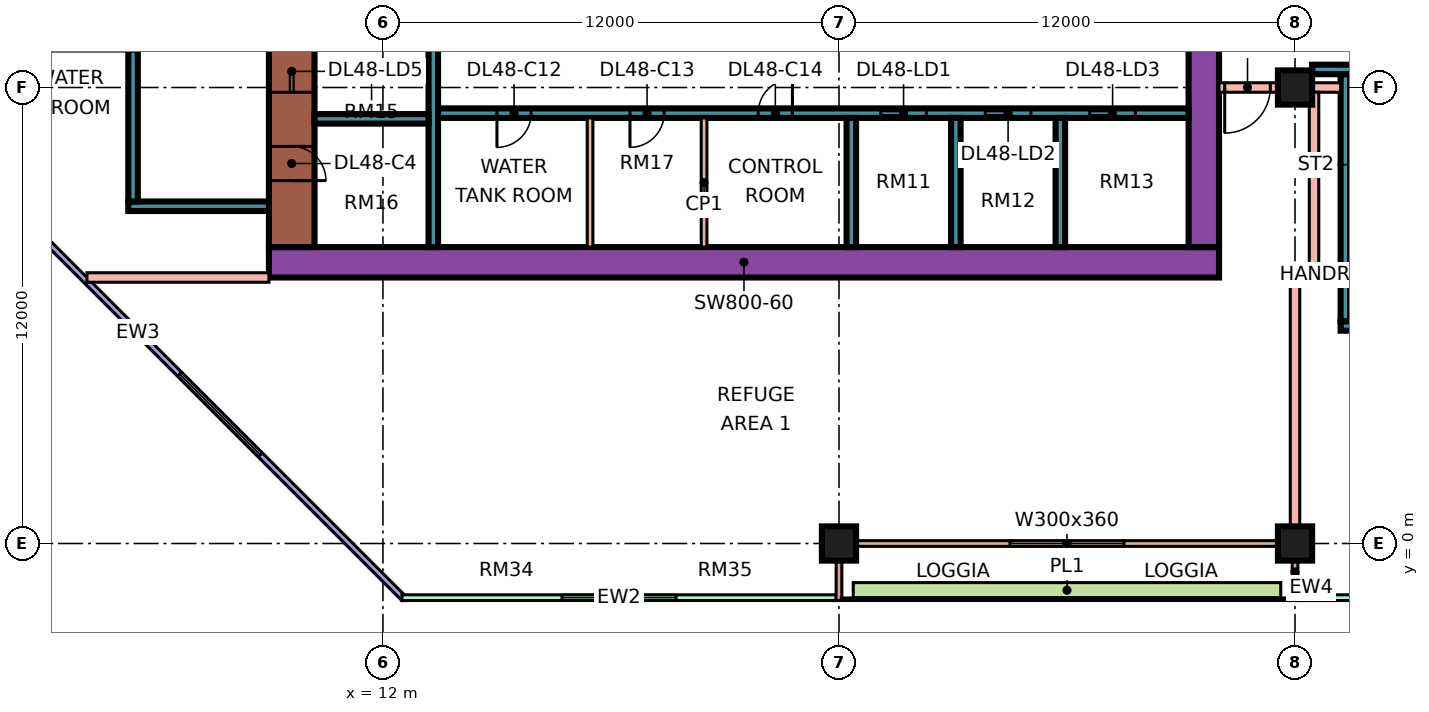
"""IFC4 building model, lengths in metres.
Left out: names, types, materials, properties, quantities, classifications, styles, units other than length and angle.
Written with IfcOpenShell. Run it as: python <this file> out.ifc"""

import sys

from ifc_helpers import new_model, si_unit, direction, frame, frame_2d, origin, origin_2d, place, context, subcontext, project, spatial, rectangle, extrude, element, fill, save


model = new_model("IFC4")
c1 = context("Model", 3, precision=1e-05, world=origin(), true_north=direction((0.0, 1.0)))
c2 = subcontext(c1, "Body", "Model", "MODEL_VIEW")
j1 = project(units=[si_unit("LENGTHUNIT", "METRE"), si_unit("PLANEANGLEUNIT", "RADIAN")], contexts=[c1])
p1 = place(None, origin())
s1 = spatial("IfcSite", under=j1, at=p1, CompositionType="ELEMENT")
p2 = place(p1, origin())
s2 = spatial("IfcBuilding", under=s1, at=p2, CompositionType="ELEMENT")
p3 = place(p2, frame((0.0, 0.0, 206.15)))
s3 = spatial("IfcBuildingStorey", under=s2, at=p3, CompositionType="ELEMENT", Elevation=206.15)
for number, where, z_axis, x_axis in (
    (1, (24.0, 0.0, 0.0), (0.0, 0.0, 1.0), (1.0, 0.0, 0.0)),
    (2, (36.0, 0.0, 0.0), (0.0, 0.0, 1.0), (1.0, 0.0, 0.0)),
    (3, (36.0, 12.0, 0.0), (0.0, 0.0, 1.0), (1.0, 0.0, 0.0)),
):
    element("IfcColumn", number, at=place(p3, frame(where, z_axis=z_axis, x_axis=x_axis)), inside=s3, PredefinedType="COLUMN", context=c2, shape_type="SweptSolid", body=[
        extrude(rectangle(XDim=0.9, YDim=0.9, at=origin_2d()), origin(), (0.0, 0.0, 1.0), 5.5),
    ])
p4 = place(p3, frame((9.0, 7.4, 0.0), z_axis=(0.0, 0.0, 1.0), x_axis=(1.0, 0.0, 0.0)))
e4 = element("IfcWall", 4, at=p4, inside=s3, PredefinedType="SHEAR", context=c2, shape_type="SweptSolid", body=[
    extrude(rectangle(XDim=25.0, YDim=0.8, at=frame_2d((12.5, 0.0))), origin(), (0.0, 0.0, 1.0), 5.5),
])
p5 = place(p3, frame((9.6, 7.8, 0.0), z_axis=(0.0, 0.0, 1.0), x_axis=(0.0, 1.0, 0.0)))
e5 = element("IfcWall", 5, at=p5, inside=s3, PredefinedType="SHEAR", context=c2, shape_type="SweptSolid", body=[
    extrude(rectangle(XDim=11.4, YDim=1.2, at=frame_2d((5.7, 0.0))), origin(), (0.0, 0.0, 1.0), 5.5),
])
p6 = place(p5, frame((4.075, 0.0, 0.0)))
e6 = element("IfcOpeningElement", 6, at=p6, cuts=e5, PredefinedType="OPENING", context=c2, shape_type="SweptSolid", body=[
    extrude(rectangle(XDim=1.1, YDim=2.2, at=frame_2d((0.55, 1.1))), frame((0.0, 0.61, 0.0), z_axis=(0.0, -1.0, 0.0), x_axis=(1.0, 0.0, 0.0)), (0.0, 0.0, 1.0), 1.22),
])
p7 = place(p5, frame((6.575, 0.0, 0.0)))
e7 = element("IfcOpeningElement", 7, at=p7, cuts=e5, PredefinedType="OPENING", context=c2, shape_type="SweptSolid", body=[
    extrude(rectangle(XDim=1.1, YDim=2.2, at=frame_2d((0.55, 1.1))), frame((0.0, 0.61, 0.0), z_axis=(0.0, -1.0, 0.0), x_axis=(1.0, 0.0, 0.0)), (0.0, 0.0, 1.0), 1.22),
])
p8 = place(p5, frame((9.4, 0.0, 0.0)))
e8 = element("IfcOpeningElement", 8, at=p8, cuts=e5, PredefinedType="OPENING", context=c2, shape_type="SweptSolid", body=[
    extrude(rectangle(XDim=1.1, YDim=2.2, at=frame_2d((0.55, 1.1))), frame((0.0, 0.61, 0.0), z_axis=(0.0, -1.0, 0.0), x_axis=(1.0, 0.0, 0.0)), (0.0, 0.0, 1.0), 1.22),
])
p9 = place(p5, frame((1.75, 0.0, 0.0)))
e9 = element("IfcOpeningElement", 9, at=p9, cuts=e5, PredefinedType="OPENING", context=c2, shape_type="SweptSolid", body=[
    extrude(rectangle(XDim=0.9, YDim=2.1, at=frame_2d((0.45, 1.05))), frame((0.0, 0.61, 0.0), z_axis=(0.0, -1.0, 0.0), x_axis=(1.0, 0.0, 0.0)), (0.0, 0.0, 1.0), 1.22),
])
p10 = place(p3, frame((33.6, 7.8, 0.0), z_axis=(0.0, 0.0, 1.0), x_axis=(0.0, 1.0, 0.0)))
e10 = element("IfcWall", 10, at=p10, inside=s3, PredefinedType="SHEAR", context=c2, shape_type="SweptSolid", body=[
    extrude(rectangle(XDim=11.4, YDim=0.8, at=frame_2d((5.7, 0.0))), origin(), (0.0, 0.0, 1.0), 5.5),
])
p11 = place(p10, frame((5.4, 0.0, 0.0)))
e11 = element("IfcOpeningElement", 11, at=p11, cuts=e10, PredefinedType="OPENING", context=c2, shape_type="SweptSolid", body=[
    extrude(rectangle(XDim=1.8, YDim=2.4, at=frame_2d((0.9, 1.2))), frame((0.0, 0.41, 0.0), z_axis=(0.0, -1.0, 0.0), x_axis=(1.0, 0.0, 0.0)), (0.0, 0.0, 1.0), 0.82),
])
p12 = place(p3, frame((13.325, 7.8, 0.0), z_axis=(0.0, 0.0, 1.0), x_axis=(0.0, 1.0, 0.0)))
e12 = element("IfcWall", 12, at=p12, inside=s3, PredefinedType="SHEAR", context=c2, shape_type="SweptSolid", body=[
    extrude(rectangle(XDim=11.4, YDim=0.25, at=frame_2d((5.7, 0.0))), origin(), (0.0, 0.0, 1.0), 5.5),
])
p13 = place(p3, frame((13.45, 11.325, 0.0), z_axis=(0.0, 0.0, 1.0), x_axis=(1.0, 0.0, 0.0)))
e13 = element("IfcWall", 13, at=p13, inside=s3, PredefinedType="SHEAR", context=c2, shape_type="SweptSolid", body=[
    extrude(rectangle(XDim=19.75, YDim=0.25, at=frame_2d((9.875, 0.0))), origin(), (0.0, 0.0, 1.0), 5.5),
])
p14 = place(p13, frame((11.65, 0.0, 0.0)))
e14 = element("IfcOpeningElement", 14, at=p14, cuts=e13, PredefinedType="OPENING", context=c2, shape_type="SweptSolid", body=[
    extrude(rectangle(XDim=1.2, YDim=2.2, at=frame_2d((0.6, 1.1))), frame((0.0, 0.135, 0.0), z_axis=(0.0, -1.0, 0.0), x_axis=(1.0, 0.0, 0.0)), (0.0, 0.0, 1.0), 0.27),
])
p15 = place(p13, frame((14.4, 0.0, 0.0)))
e15 = element("IfcOpeningElement", 15, at=p15, cuts=e13, PredefinedType="OPENING", context=c2, shape_type="SweptSolid", body=[
    extrude(rectangle(XDim=1.2, YDim=2.2, at=frame_2d((0.6, 1.1))), frame((0.0, 0.135, 0.0), z_axis=(0.0, -1.0, 0.0), x_axis=(1.0, 0.0, 0.0)), (0.0, 0.0, 1.0), 0.27),
])
p16 = place(p13, frame((17.15, 0.0, 0.0)))
e16 = element("IfcOpeningElement", 16, at=p16, cuts=e13, PredefinedType="OPENING", context=c2, shape_type="SweptSolid", body=[
    extrude(rectangle(XDim=1.2, YDim=2.2, at=frame_2d((0.6, 1.1))), frame((0.0, 0.135, 0.0), z_axis=(0.0, -1.0, 0.0), x_axis=(1.0, 0.0, 0.0)), (0.0, 0.0, 1.0), 0.27),
])
p17 = place(p13, frame((1.55, 0.0, 0.0)))
e17 = element("IfcOpeningElement", 17, at=p17, cuts=e13, PredefinedType="OPENING", context=c2, shape_type="SweptSolid", body=[
    extrude(rectangle(XDim=0.9, YDim=2.1, at=frame_2d((0.45, 1.05))), frame((0.0, 0.135, 0.0), z_axis=(0.0, -1.0, 0.0), x_axis=(1.0, 0.0, 0.0)), (0.0, 0.0, 1.0), 0.27),
])
p18 = place(p13, frame((5.05, 0.0, 0.0)))
e18 = element("IfcOpeningElement", 18, at=p18, cuts=e13, PredefinedType="OPENING", context=c2, shape_type="SweptSolid", body=[
    extrude(rectangle(XDim=0.9, YDim=2.1, at=frame_2d((0.45, 1.05))), frame((0.0, 0.135, 0.0), z_axis=(0.0, -1.0, 0.0), x_axis=(1.0, 0.0, 0.0)), (0.0, 0.0, 1.0), 0.27),
])
p19 = place(p13, frame((8.425, 0.0, 0.0)))
e19 = element("IfcOpeningElement", 19, at=p19, cuts=e13, PredefinedType="OPENING", context=c2, shape_type="SweptSolid", body=[
    extrude(rectangle(XDim=0.9, YDim=2.1, at=frame_2d((0.45, 1.05))), frame((0.0, 0.135, 0.0), z_axis=(0.0, -1.0, 0.0), x_axis=(1.0, 0.0, 0.0)), (0.0, 0.0, 1.0), 0.27),
])
p20 = place(p3, frame((10.2, 11.175, 0.0), z_axis=(0.0, 0.0, 1.0), x_axis=(1.0, 0.0, 0.0)))
e20 = element("IfcWall", 20, at=p20, inside=s3, PredefinedType="SHEAR", context=c2, shape_type="SweptSolid", body=[
    extrude(rectangle(XDim=3.0, YDim=0.25, at=frame_2d((1.5, 0.0))), origin(), (0.0, 0.0, 1.0), 5.5),
])
for number, where, z_axis, x_axis in (
    (21, (24.325, 7.8, 0.0), (0.0, 0.0, 1.0), (0.0, 1.0, 0.0)),
    (22, (27.075, 7.8, 0.0), (0.0, 0.0, 1.0), (0.0, 1.0, 0.0)),
    (23, (29.825, 7.8, 0.0), (0.0, 0.0, 1.0), (0.0, 1.0, 0.0)),
):
    element("IfcWall", number, at=place(p3, frame(where, z_axis=z_axis, x_axis=x_axis)), inside=s3, PredefinedType="SHEAR", context=c2, shape_type="SweptSolid", body=[
        extrude(rectangle(XDim=3.4, YDim=0.25, at=frame_2d((1.7, 0.0))), origin(), (0.0, 0.0, 1.0), 5.5),
    ])
p21 = place(p3, frame((5.3, 8.875, 0.0), z_axis=(0.0, 0.0, 1.0), x_axis=(1.0, 0.0, 0.0)))
e24 = element("IfcWall", 24, at=p21, inside=s3, PredefinedType="SHEAR", context=c2, shape_type="SweptSolid", body=[
    extrude(rectangle(XDim=3.7, YDim=0.25, at=frame_2d((1.85, 0.0))), origin(), (0.0, 0.0, 1.0), 5.5),
])
p22 = place(p3, frame((5.425, 9.0, 0.0), z_axis=(0.0, 0.0, 1.0), x_axis=(0.0, 1.0, 0.0)))
e25 = element("IfcWall", 25, at=p22, inside=s3, PredefinedType="SHEAR", context=c2, shape_type="SweptSolid", body=[
    extrude(rectangle(XDim=4.0, YDim=0.25, at=frame_2d((2.0, 0.0))), origin(), (0.0, 0.0, 1.0), 5.5),
])
p23 = place(p3, frame((37.2, 5.725, 0.0), z_axis=(0.0, 0.0, 1.0), x_axis=(1.0, 0.0, 0.0)))
e26 = element("IfcWall", 26, at=p23, inside=s3, PredefinedType="SHEAR", context=c2, shape_type="SweptSolid", body=[
    extrude(rectangle(XDim=3.45, YDim=0.25, at=frame_2d((1.725, 0.0))), origin(), (0.0, 0.0, 1.0), 5.5),
])
p24 = place(p3, frame((36.45, 12.475, 0.0), z_axis=(0.0, 0.0, 1.0), x_axis=(1.0, 0.0, 0.0)))
e27 = element("IfcWall", 27, at=p24, inside=s3, PredefinedType="SHEAR", context=c2, shape_type="SweptSolid", body=[
    extrude(rectangle(XDim=4.2, YDim=0.25, at=frame_2d((2.1, 0.0))), origin(), (0.0, 0.0, 1.0), 5.5),
])
p25 = place(p24, frame((1.925, 0.0, 0.0)))
e28 = element("IfcOpeningElement", 28, at=p25, cuts=e27, PredefinedType="OPENING", context=c2, shape_type="SweptSolid", body=[
    extrude(rectangle(XDim=1.1, YDim=2.2, at=frame_2d((0.55, 1.1))), frame((0.0, 0.135, 0.0), z_axis=(0.0, -1.0, 0.0), x_axis=(1.0, 0.0, 0.0)), (0.0, 0.0, 1.0), 0.27),
])
p26 = place(p3, frame((37.325, 5.85, 0.0), z_axis=(0.0, 0.0, 1.0), x_axis=(0.0, 1.0, 0.0)))
e29 = element("IfcWall", 29, at=p26, inside=s3, PredefinedType="SHEAR", context=c2, shape_type="SweptSolid", body=[
    extrude(rectangle(XDim=6.5, YDim=0.25, at=frame_2d((3.25, 0.0))), origin(), (0.0, 0.0, 1.0), 5.5),
])
p27 = place(p3, frame((-1.447, 12.553, 0.0), z_axis=(0.0, 0.0, 1.0), x_axis=(0.707106781187, -0.707106781187, 0.0)))
e30 = element("IfcWall", 30, at=p27, inside=s3, PredefinedType="SOLIDWALL", context=c2, shape_type="SweptSolid", body=[
    extrude(rectangle(XDim=19.799, YDim=0.15, at=frame_2d((9.899, 0.0))), origin(), (0.0, 0.0, 1.0), 5.1),
])
p28 = place(p27, frame((11.453, 0.0, 0.45)))
e31 = element("IfcOpeningElement", 31, at=p28, cuts=e30, PredefinedType="OPENING", context=c2, shape_type="SweptSolid", body=[
    extrude(rectangle(XDim=3.0, YDim=3.6, at=frame_2d((1.5, 1.8))), frame((0.0, 0.085, 0.0), z_axis=(0.0, -1.0, 0.0), x_axis=(1.0, 0.0, 0.0)), (0.0, 0.0, 1.0), 0.17),
])
p29 = place(p3, frame((12.5, -1.425, 0.0), z_axis=(0.0, 0.0, 1.0), x_axis=(1.0, 0.0, 0.0)))
e32 = element("IfcWall", 32, at=p29, inside=s3, PredefinedType="SOLIDWALL", context=c2, shape_type="SweptSolid", body=[
    extrude(rectangle(XDim=11.425, YDim=0.15, at=frame_2d((5.712, 0.0))), origin(), (0.0, 0.0, 1.0), 5.1),
])
p30 = place(p29, frame((4.212, 0.0, 0.45)))
e33 = element("IfcOpeningElement", 33, at=p30, cuts=e32, PredefinedType="OPENING", context=c2, shape_type="SweptSolid", body=[
    extrude(rectangle(XDim=3.0, YDim=3.6, at=frame_2d((1.5, 1.8))), frame((0.0, 0.085, 0.0), z_axis=(0.0, -1.0, 0.0), x_axis=(1.0, 0.0, 0.0)), (0.0, 0.0, 1.0), 0.17),
])
p31 = place(p3, frame((24.075, 0.0, 0.0), z_axis=(0.0, 0.0, 1.0), x_axis=(1.0, 0.0, 0.0)))
e34 = element("IfcWall", 34, at=p31, inside=s3, PredefinedType="SOLIDWALL", context=c2, shape_type="SweptSolid", body=[
    extrude(rectangle(XDim=11.85, YDim=0.15, at=frame_2d((5.925, 0.0))), origin(), (0.0, 0.0, 1.0), 5.1),
])
p32 = place(p31, frame((4.425, 0.0, 0.45)))
e35 = element("IfcOpeningElement", 35, at=p32, cuts=e34, PredefinedType="OPENING", context=c2, shape_type="SweptSolid", body=[
    extrude(rectangle(XDim=3.0, YDim=3.6, at=frame_2d((1.5, 1.8))), frame((0.0, 0.085, 0.0), z_axis=(0.0, -1.0, 0.0), x_axis=(1.0, 0.0, 0.0)), (0.0, 0.0, 1.0), 0.17),
])
for number, where, z_axis, x_axis in (
    (36, (24.0, -1.5, 0.0), (0.0, 0.0, 1.0), (0.0, 1.0, 0.0)),
    (37, (36.0, -1.5, 0.0), (0.0, 0.0, 1.0), (0.0, 1.0, 0.0)),
):
    element("IfcWall", number, at=place(p3, frame(where, z_axis=z_axis, x_axis=x_axis)), inside=s3, PredefinedType="SOLIDWALL", context=c2, shape_type="SweptSolid", body=[
        extrude(rectangle(XDim=1.5, YDim=0.15, at=frame_2d((0.75, 0.0))), origin(), (0.0, 0.0, 1.0), 5.1),
    ])
p33 = place(p3, frame((36.075, -1.425, 0.0), z_axis=(0.0, 0.0, 1.0), x_axis=(1.0, 0.0, 0.0)))
e38 = element("IfcWall", 38, at=p33, inside=s3, PredefinedType="SOLIDWALL", context=c2, shape_type="SweptSolid", body=[
    extrude(rectangle(XDim=11.85, YDim=0.15, at=frame_2d((5.925, 0.0))), origin(), (0.0, 0.0, 1.0), 5.1),
])
p34 = place(p33, frame((2.962, 0.0, 0.45)))
e39 = element("IfcOpeningElement", 39, at=p34, cuts=e38, PredefinedType="OPENING", context=c2, shape_type="SweptSolid", body=[
    extrude(rectangle(XDim=3.0, YDim=3.6, at=frame_2d((1.5, 1.8))), frame((0.0, 0.085, 0.0), z_axis=(0.0, -1.0, 0.0), x_axis=(1.0, 0.0, 0.0)), (0.0, 0.0, 1.0), 0.17),
])
p35 = place(p33, frame((9.488, 0.0, 0.45)))
e40 = element("IfcOpeningElement", 40, at=p35, cuts=e38, PredefinedType="OPENING", context=c2, shape_type="SweptSolid", body=[
    extrude(rectangle(XDim=1.8, YDim=3.6, at=frame_2d((0.9, 1.8))), frame((0.0, 0.085, 0.0), z_axis=(0.0, -1.0, 0.0), x_axis=(1.0, 0.0, 0.0)), (0.0, 0.0, 1.0), 0.17),
])
p36 = place(p3, frame((24.375, -1.229, 0.0), z_axis=(0.0, 0.0, 1.0), x_axis=(1.0, 0.0, 0.0)))
e41 = element("IfcWall", 41, at=p36, inside=s3, PredefinedType="SOLIDWALL", context=c2, shape_type="SweptSolid", body=[
    extrude(rectangle(XDim=11.25, YDim=0.4, at=frame_2d((5.625, 0.0))), origin(), (0.0, 0.0, 1.0), 0.7),
])
for number, where, z_axis, x_axis in (
    (42, (17.45, 7.8, 0.0), (0.0, 0.0, 1.0), (0.0, 1.0, 0.0)),
    (43, (20.45, 7.8, 0.0), (0.0, 0.0, 1.0), (0.0, 1.0, 0.0)),
):
    element("IfcWall", number, at=place(p3, frame(where, z_axis=z_axis, x_axis=x_axis)), inside=s3, PredefinedType="PARTITIONING", context=c2, shape_type="SweptSolid", body=[
        extrude(rectangle(XDim=3.4, YDim=0.15, at=frame_2d((1.7, 0.0))), origin(), (0.0, 0.0, 1.0), 5.1),
    ])
p37 = place(p3, frame((4.211, 7.0, 0.0), z_axis=(0.0, 0.0, 1.0), x_axis=(1.0, 0.0, 0.0)))
e44 = element("IfcWall", 44, at=p37, inside=s3, PredefinedType="PARTITIONING", context=c2, shape_type="SweptSolid", body=[
    extrude(rectangle(XDim=4.789, YDim=0.25, at=frame_2d((2.395, 0.0))), origin(), (0.0, 0.0, 1.0), 5.1),
])
p38 = place(p3, frame((34.0, 12.0, 0.0), z_axis=(0.0, 0.0, 1.0), x_axis=(1.0, 0.0, 0.0)))
e45 = element("IfcWall", 45, at=p38, inside=s3, PredefinedType="PARTITIONING", context=c2, shape_type="SweptSolid", body=[
    extrude(rectangle(XDim=3.2, YDim=0.25, at=frame_2d((1.6, 0.0))), origin(), (0.0, 0.0, 1.0), 5.1),
])
p39 = place(p38, frame((0.15, 0.0, 0.0)))
e46 = element("IfcOpeningElement", 46, at=p39, cuts=e45, PredefinedType="OPENING", context=c2, shape_type="SweptSolid", body=[
    extrude(rectangle(XDim=1.2, YDim=2.1, at=frame_2d((0.6, 1.05))), frame((0.0, 0.135, 0.0), z_axis=(0.0, -1.0, 0.0), x_axis=(1.0, 0.0, 0.0)), (0.0, 0.0, 1.0), 0.27),
])
p40 = place(p3, frame((36.0, 0.0, 0.0), z_axis=(0.0, 0.0, 1.0), x_axis=(0.0, 1.0, 0.0)))
e47 = element("IfcWall", 47, at=p40, inside=s3, PredefinedType="PARTITIONING", context=c2, shape_type="SweptSolid", body=[
    extrude(rectangle(XDim=7.125, YDim=0.25, at=frame_2d((3.562, 0.0))), origin(), (0.0, 0.0, 1.0), 5.1),
])
p41 = place(p3, frame((36.125, 7.0, 0.0), z_axis=(0.0, 0.0, 1.0), x_axis=(1.0, 0.0, 0.0)))
e48 = element("IfcWall", 48, at=p41, inside=s3, PredefinedType="PARTITIONING", context=c2, shape_type="SweptSolid", body=[
    extrude(rectangle(XDim=0.25, YDim=0.25, at=frame_2d((0.125, 0.0))), origin(), (0.0, 0.0, 1.0), 5.1),
])
p42 = place(p3, frame((36.5, 6.875, 0.0), z_axis=(0.0, 0.0, 1.0), x_axis=(0.0, 1.0, 0.0)))
e49 = element("IfcWall", 49, at=p42, inside=s3, PredefinedType="PARTITIONING", context=c2, shape_type="SweptSolid", body=[
    extrude(rectangle(XDim=5.0, YDim=0.25, at=frame_2d((2.5, 0.0))), origin(), (0.0, 0.0, 1.0), 5.1),
])
p43 = place(p28, origin())
e50 = element("IfcWindow", 50, at=p43, inside=s3, PartitioningType="SINGLE_PANEL", PredefinedType="WINDOW", context=c2, shape_type="SweptSolid", body=[
    extrude(rectangle(XDim=3.0, YDim=3.6, at=frame_2d((1.5, 1.8))), frame((0.0, 0.03, 0.0), z_axis=(0.0, -1.0, 0.0), x_axis=(1.0, 0.0, 0.0)), (0.0, 0.0, 1.0), 0.06),
])
fill(e31, e50)
p44 = place(p30, origin())
e51 = element("IfcWindow", 51, at=p44, inside=s3, PartitioningType="SINGLE_PANEL", PredefinedType="WINDOW", context=c2, shape_type="SweptSolid", body=[
    extrude(rectangle(XDim=3.0, YDim=3.6, at=frame_2d((1.5, 1.8))), frame((0.0, 0.03, 0.0), z_axis=(0.0, -1.0, 0.0), x_axis=(1.0, 0.0, 0.0)), (0.0, 0.0, 1.0), 0.06),
])
fill(e33, e51)
p45 = place(p32, origin())
e52 = element("IfcWindow", 52, at=p45, inside=s3, PartitioningType="SINGLE_PANEL", PredefinedType="WINDOW", context=c2, shape_type="SweptSolid", body=[
    extrude(rectangle(XDim=3.0, YDim=3.6, at=frame_2d((1.5, 1.8))), frame((0.0, 0.03, 0.0), z_axis=(0.0, -1.0, 0.0), x_axis=(1.0, 0.0, 0.0)), (0.0, 0.0, 1.0), 0.06),
])
fill(e35, e52)
p46 = place(p14, origin())
e53 = element("IfcDoor", 53, at=p46, inside=s3, OperationType="DOUBLE_DOOR_SLIDING", PredefinedType="DOOR", context=c2, shape_type="SweptSolid", body=[
    extrude(rectangle(XDim=1.2, YDim=2.2, at=frame_2d((0.6, 1.1))), frame((0.0, 0.025, 0.0), z_axis=(0.0, -1.0, 0.0), x_axis=(1.0, 0.0, 0.0)), (0.0, 0.0, 1.0), 0.05),
])
fill(e14, e53)
p47 = place(p15, origin())
e54 = element("IfcDoor", 54, at=p47, inside=s3, OperationType="DOUBLE_DOOR_SLIDING", PredefinedType="DOOR", context=c2, shape_type="SweptSolid", body=[
    extrude(rectangle(XDim=1.2, YDim=2.2, at=frame_2d((0.6, 1.1))), frame((0.0, 0.025, 0.0), z_axis=(0.0, -1.0, 0.0), x_axis=(1.0, 0.0, 0.0)), (0.0, 0.0, 1.0), 0.05),
])
fill(e15, e54)
p48 = place(p16, origin())
e55 = element("IfcDoor", 55, at=p48, inside=s3, OperationType="DOUBLE_DOOR_SLIDING", PredefinedType="DOOR", context=c2, shape_type="SweptSolid", body=[
    extrude(rectangle(XDim=1.2, YDim=2.2, at=frame_2d((0.6, 1.1))), frame((0.0, 0.025, 0.0), z_axis=(0.0, -1.0, 0.0), x_axis=(1.0, 0.0, 0.0)), (0.0, 0.0, 1.0), 0.05),
])
fill(e16, e55)
p49 = place(p6, origin())
e56 = element("IfcDoor", 56, at=p49, inside=s3, OperationType="DOUBLE_DOOR_SLIDING", PredefinedType="DOOR", context=c2, shape_type="SweptSolid", body=[
    extrude(rectangle(XDim=1.1, YDim=2.2, at=frame_2d((0.55, 1.1))), frame((0.0, 0.025, 0.0), z_axis=(0.0, -1.0, 0.0), x_axis=(1.0, 0.0, 0.0)), (0.0, 0.0, 1.0), 0.05),
])
fill(e6, e56)
p50 = place(p9, frame((0.9, 0.0, 0.0), z_axis=(0.0, 0.0, 1.0), x_axis=(-1.0, 0.0, 0.0)))
e57 = element("IfcDoor", 57, at=p50, inside=s3, OperationType="SINGLE_SWING_LEFT", PredefinedType="DOOR", context=c2, shape_type="SweptSolid", body=[
    extrude(rectangle(XDim=0.9, YDim=2.1, at=frame_2d((0.45, 1.05))), frame((0.0, 0.025, 0.0), z_axis=(0.0, -1.0, 0.0), x_axis=(1.0, 0.0, 0.0)), (0.0, 0.0, 1.0), 0.05),
])
fill(e9, e57)
p51 = place(p17, frame((0.9, 0.0, 0.0), z_axis=(0.0, 0.0, 1.0), x_axis=(-1.0, 0.0, 0.0)))
e58 = element("IfcDoor", 58, at=p51, inside=s3, OperationType="SINGLE_SWING_LEFT", PredefinedType="DOOR", context=c2, shape_type="SweptSolid", body=[
    extrude(rectangle(XDim=0.9, YDim=2.1, at=frame_2d((0.45, 1.05))), frame((0.0, 0.025, 0.0), z_axis=(0.0, -1.0, 0.0), x_axis=(1.0, 0.0, 0.0)), (0.0, 0.0, 1.0), 0.05),
])
fill(e17, e58)
p52 = place(p18, frame((0.9, 0.0, 0.0), z_axis=(0.0, 0.0, 1.0), x_axis=(-1.0, 0.0, 0.0)))
e59 = element("IfcDoor", 59, at=p52, inside=s3, OperationType="SINGLE_SWING_LEFT", PredefinedType="DOOR", context=c2, shape_type="SweptSolid", body=[
    extrude(rectangle(XDim=0.9, YDim=2.1, at=frame_2d((0.45, 1.05))), frame((0.0, 0.025, 0.0), z_axis=(0.0, -1.0, 0.0), x_axis=(1.0, 0.0, 0.0)), (0.0, 0.0, 1.0), 0.05),
])
fill(e18, e59)
p53 = place(p19, frame((0.9, 0.0, 0.0), z_axis=(0.0, 0.0, 1.0), x_axis=(-1.0, 0.0, 0.0)))
e60 = element("IfcDoor", 60, at=p53, inside=s3, OperationType="SINGLE_SWING_RIGHT", PredefinedType="DOOR", context=c2, shape_type="SweptSolid", body=[
    extrude(rectangle(XDim=0.9, YDim=2.1, at=frame_2d((0.45, 1.05))), frame((0.0, 0.025, 0.0), z_axis=(0.0, -1.0, 0.0), x_axis=(1.0, 0.0, 0.0)), (0.0, 0.0, 1.0), 0.05),
])
fill(e19, e60)
p54 = place(p39, frame((1.2, 0.0, 0.0), z_axis=(0.0, 0.0, 1.0), x_axis=(-1.0, 0.0, 0.0)))
e61 = element("IfcDoor", 61, at=p54, inside=s3, OperationType="SINGLE_SWING_LEFT", PredefinedType="DOOR", context=c2, shape_type="SweptSolid", body=[
    extrude(rectangle(XDim=1.2, YDim=2.1, at=frame_2d((0.6, 1.05))), frame((0.0, 0.025, 0.0), z_axis=(0.0, -1.0, 0.0), x_axis=(1.0, 0.0, 0.0)), (0.0, 0.0, 1.0), 0.05),
])
fill(e46, e61)
save(model, sys.argv[1])
